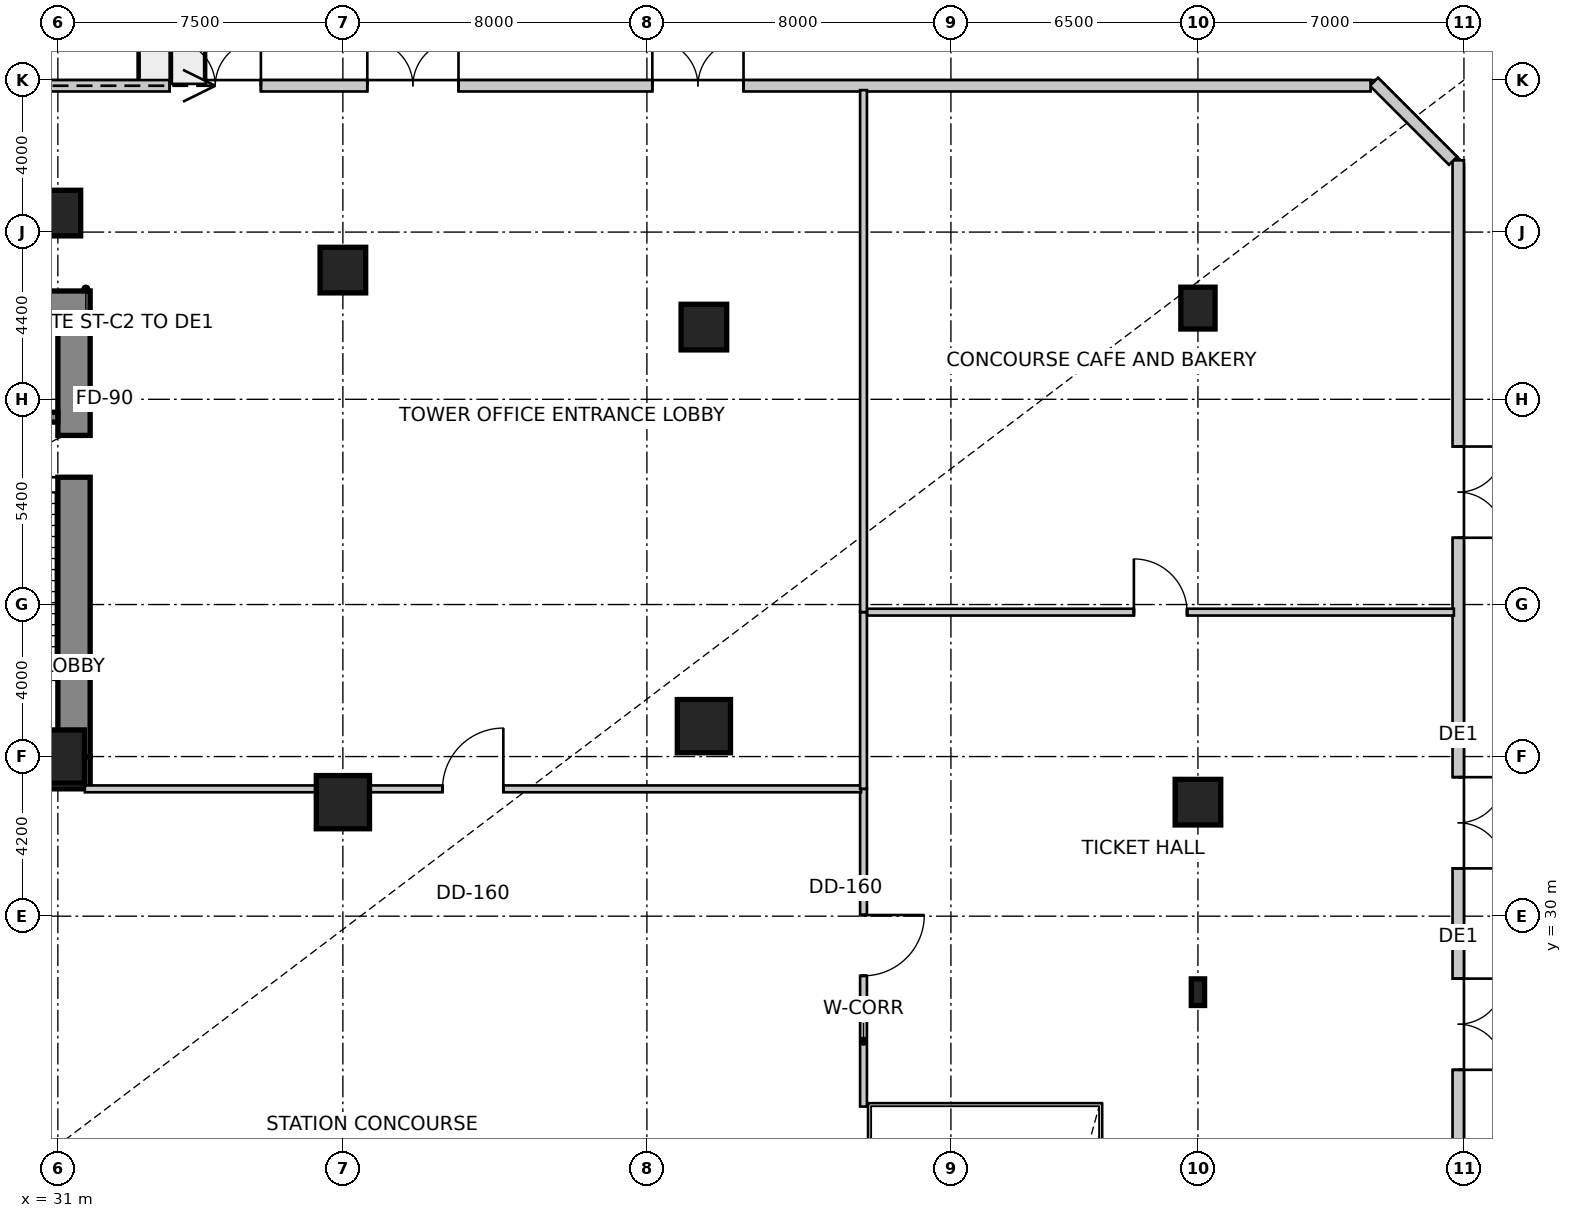
"""IFC4 building model, lengths in metres.
Left out: names, types, materials, properties, quantities, classifications, styles, units other than length and angle.
Written with IfcOpenShell. Run it as: python <this file> out.ifc"""

import sys

from ifc_helpers import new_model, si_unit, direction, frame, frame_2d, origin, origin_2d, place, context, subcontext, project, spatial, rectangle, extrude, source, transform, mapped, element, fill, save


model = new_model("IFC4")
c1 = context("Model", 3, precision=1e-05, world=origin(), true_north=direction((0.0, 1.0)))
c2 = subcontext(c1, "Body", "Model", "MODEL_VIEW")
j1 = project(units=[si_unit("LENGTHUNIT", "METRE"), si_unit("PLANEANGLEUNIT", "RADIAN")], contexts=[c1])
p1 = place(None, origin())
s1 = spatial("IfcSite", under=j1, at=p1, CompositionType="ELEMENT")
p2 = place(p1, origin())
s2 = spatial("IfcBuilding", under=s1, at=p2, CompositionType="ELEMENT")
p3 = place(p2, origin())
s3 = spatial("IfcBuildingStorey", under=s2, at=p3, CompositionType="ELEMENT", Elevation=0.0)
p4 = place(p3, frame((15.75, 46.025, 0.0), z_axis=(0.0, 0.0, 1.0), x_axis=(1.0, 0.0, 0.0)))
e1 = element("IfcWall", 1, at=p4, inside=s3, PredefinedType="SHEAR", context=c2, shape_type="SweptSolid", body=[
    extrude(rectangle(XDim=16.1, YDim=0.85, at=frame_2d((8.05, 0.0))), origin(), (0.0, 0.0, 1.0), 6.0),
])
p5 = place(p3, frame((15.75, 33.775, 0.0), z_axis=(0.0, 0.0, 1.0), x_axis=(1.0, 0.0, 0.0)))
e2 = element("IfcWall", 2, at=p5, inside=s3, PredefinedType="SHEAR", context=c2, shape_type="SweptSolid", body=[
    extrude(rectangle(XDim=16.1, YDim=0.85, at=frame_2d((8.05, 0.0))), origin(), (0.0, 0.0, 1.0), 6.0),
])
m1 = source(origin(), c2, "Body", "SweptSolid", [
    extrude(rectangle(XDim=1.3, YDim=2.15, at=frame_2d((0.65, 1.075))), frame((0.0, 0.435, 0.0), z_axis=(0.0, -1.0, 0.0), x_axis=(1.0, 0.0, 0.0)), (0.0, 0.0, 1.0), 0.87),
])
p6 = place(p5, frame((10.18, 0.0, 0.0)))
e3 = element("IfcOpeningElement", 3, at=p6, cuts=e2, PredefinedType="OPENING", context=c2, shape_type="MappedRepresentation", body=[
    mapped(m1, transform((0.0, 0.0, 0.0), scale=1.0)),
])
p7 = place(p3, frame((31.425, 34.2, 0.0), z_axis=(0.0, 0.0, 1.0), x_axis=(0.0, 1.0, 0.0)))
e4 = element("IfcWall", 4, at=p7, inside=s3, PredefinedType="SHEAR", context=c2, shape_type="SweptSolid", body=[
    extrude(rectangle(XDim=11.4, YDim=0.85, at=frame_2d((5.7, 0.0))), origin(), (0.0, 0.0, 1.0), 6.0),
])
m2 = source(origin(), c2, "Body", "SweptSolid", [
    extrude(rectangle(XDim=1.1, YDim=2.15, at=frame_2d((0.55, 1.075))), frame((0.0, 0.435, 0.0), z_axis=(0.0, -1.0, 0.0), x_axis=(1.0, 0.0, 0.0)), (0.0, 0.0, 1.0), 0.87),
])
p8 = place(p7, frame((7.35, 0.0, 0.0)))
e5 = element("IfcOpeningElement", 5, at=p8, cuts=e4, PredefinedType="OPENING", context=c2, shape_type="MappedRepresentation", body=[
    mapped(m2, transform((0.0, 0.0, 0.0), scale=1.0)),
])
p9 = place(p3, frame((27.5, 43.13, 0.0), z_axis=(0.0, 0.0, 1.0), x_axis=(1.0, 0.0, 0.0)))
e6 = element("IfcWall", 6, at=p9, inside=s3, PredefinedType="SHEAR", context=c2, shape_type="SweptSolid", body=[
    extrude(rectangle(XDim=3.5, YDim=0.26, at=frame_2d((1.75, 0.0))), origin(), (0.0, 0.0, 1.0), 6.0),
])
m3 = source(origin(), c2, "Body", "SweptSolid", [
    extrude(rectangle(XDim=1.4, YDim=1.4, at=origin_2d()), origin(), (0.0, 0.0, 1.0), 6.0),
])
for number, where, z_axis, x_axis in (
    (7, (31.0, 34.2, 0.0), (0.0, 0.0, 1.0), (1.0, 0.0, 0.0)),
    (8, (38.5, 33.0, 0.0), (0.0, 0.0, 1.0), (1.0, 0.0, 0.0)),
    (9, (48.0, 35.0, 0.0), (0.0, 0.0, 1.0), (1.0, 0.0, 0.0)),
):
    element("IfcColumn", number, at=place(p3, frame(where, z_axis=z_axis, x_axis=x_axis)), inside=s3, PredefinedType="COLUMN", context=c2, shape_type="MappedRepresentation", body=[
        mapped(m3, transform((0.0, 0.0, 0.0), scale=1.0)),
    ])
m4 = source(origin(), c2, "Body", "SweptSolid", [
    extrude(rectangle(XDim=1.2, YDim=1.2, at=origin_2d()), origin(), (0.0, 0.0, 1.0), 6.0),
])
for number, where, z_axis, x_axis in (
    (10, (61.0, 33.0, 0.0), (0.0, 0.0, 1.0), (1.0, 0.0, 0.0)),
    (11, (31.0, 48.5, 0.0), (0.0, 0.0, 1.0), (1.0, 0.0, 0.0)),
    (12, (38.5, 47.0, 0.0), (0.0, 0.0, 1.0), (1.0, 0.0, 0.0)),
    (13, (48.0, 45.5, 0.0), (0.0, 0.0, 1.0), (1.0, 0.0, 0.0)),
):
    element("IfcColumn", number, at=place(p3, frame(where, z_axis=z_axis, x_axis=x_axis)), inside=s3, PredefinedType="COLUMN", context=c2, shape_type="MappedRepresentation", body=[
        mapped(m4, transform((0.0, 0.0, 0.0), scale=1.0)),
    ])
m5 = source(origin(), c2, "Body", "SweptSolid", [
    extrude(rectangle(XDim=0.9, YDim=1.1, at=origin_2d()), origin(), (0.0, 0.0, 1.0), 6.0),
])
p10 = place(p3, frame((61.0, 46.0, 0.0), z_axis=(0.0, 0.0, 1.0), x_axis=(1.0, 0.0, 0.0)))
e14 = element("IfcColumn", 14, at=p10, inside=s3, PredefinedType="COLUMN", context=c2, shape_type="MappedRepresentation", body=[
    mapped(m5, transform((0.0, 0.0, 0.0), scale=1.0)),
])
m6 = source(origin(), c2, "Body", "SweptSolid", [
    extrude(rectangle(XDim=0.35, YDim=0.7, at=origin_2d()), origin(), (0.0, 0.0, 1.0), 6.0),
])
p11 = place(p3, frame((61.0, 28.0, 0.0), z_axis=(0.0, 0.0, 1.0), x_axis=(1.0, 0.0, 0.0)))
e15 = element("IfcColumn", 15, at=p11, inside=s3, PredefinedType="PILASTER", context=c2, shape_type="MappedRepresentation", body=[
    mapped(m6, transform((0.0, 0.0, 0.0), scale=1.0)),
])
p12 = place(p3, frame((67.85, 49.888, 0.0), z_axis=(0.0, 0.0, 1.0), x_axis=(0.0, -1.0, 0.0)))
e16 = element("IfcWall", 16, at=p12, inside=s3, PredefinedType="SOLIDWALL", context=c2, shape_type="SweptSolid", body=[
    extrude(rectangle(XDim=45.431, YDim=0.3, at=frame_2d((22.715, 0.0))), origin(), (0.0, 0.0, 1.0), 5.7),
])
m7 = source(origin(), c2, "Body", "SweptSolid", [
    extrude(rectangle(XDim=2.4, YDim=2.8, at=frame_2d((1.2, 1.4))), frame((0.0, 0.16, 0.0), z_axis=(0.0, -1.0, 0.0), x_axis=(1.0, 0.0, 0.0)), (0.0, 0.0, 1.0), 0.32),
])
p13 = place(p12, frame((21.531, 0.0, 0.0)))
e17 = element("IfcOpeningElement", 17, at=p13, cuts=e16, PredefinedType="OPENING", context=c2, shape_type="MappedRepresentation", body=[
    mapped(m7, transform((0.0, 0.0, 0.0), scale=1.0)),
])
p14 = place(p12, frame((16.231, 0.0, 0.0)))
e18 = element("IfcOpeningElement", 18, at=p14, cuts=e16, PredefinedType="OPENING", context=c2, shape_type="MappedRepresentation", body=[
    mapped(m7, transform((0.0, 0.0, 0.0), scale=1.0)),
])
p15 = place(p12, frame((7.531, 0.0, 0.0)))
e19 = element("IfcOpeningElement", 19, at=p15, cuts=e16, PredefinedType="OPENING", context=c2, shape_type="MappedRepresentation", body=[
    mapped(m7, transform((0.0, 0.0, 0.0), scale=1.0)),
])
p16 = place(p3, frame((65.632, 51.956, 0.0), z_axis=(0.0, 0.0, 1.0), x_axis=(0.707106781187, -0.707106781187, 0.0)))
e20 = element("IfcWall", 20, at=p16, inside=s3, PredefinedType="SOLIDWALL", context=c2, shape_type="SweptSolid", body=[
    extrude(rectangle(XDim=2.942, YDim=0.3, at=frame_2d((1.471, 0.0))), origin(), (0.0, 0.0, 1.0), 5.7),
])
p17 = place(p3, frame((4.112, 51.85, 0.0), z_axis=(0.0, 0.0, 1.0), x_axis=(1.0, 0.0, 0.0)))
e21 = element("IfcWall", 21, at=p17, inside=s3, PredefinedType="SOLIDWALL", context=c2, shape_type="SweptSolid", body=[
    extrude(rectangle(XDim=61.431, YDim=0.3, at=frame_2d((30.715, 0.0))), origin(), (0.0, 0.0, 1.0), 5.7),
])
p18 = place(p17, frame((42.531, 0.0, 0.0)))
e22 = element("IfcOpeningElement", 22, at=p18, cuts=e21, PredefinedType="OPENING", context=c2, shape_type="MappedRepresentation", body=[
    mapped(m7, transform((0.0, 0.0, 0.0), scale=1.0)),
])
p19 = place(p17, frame((35.031, 0.0, 0.0)))
e23 = element("IfcOpeningElement", 23, at=p19, cuts=e21, PredefinedType="OPENING", context=c2, shape_type="MappedRepresentation", body=[
    mapped(m7, transform((0.0, 0.0, 0.0), scale=1.0)),
])
p20 = place(p17, frame((29.831, 0.0, 0.0)))
e24 = element("IfcOpeningElement", 24, at=p20, cuts=e21, PredefinedType="OPENING", context=c2, shape_type="MappedRepresentation", body=[
    mapped(m7, transform((0.0, 0.0, 0.0), scale=1.0)),
])
m8 = source(origin(), c2, "Body", "SweptSolid", [
    extrude(rectangle(XDim=1.8, YDim=2.4, at=frame_2d((0.9, 1.2))), frame((0.0, 0.16, 0.0), z_axis=(0.0, -1.0, 0.0), x_axis=(1.0, 0.0, 0.0)), (0.0, 0.0, 1.0), 0.32),
])
p21 = place(p17, frame((9.181, 0.0, 0.0)))
e25 = element("IfcOpeningElement", 25, at=p21, cuts=e21, PredefinedType="OPENING", context=c2, shape_type="MappedRepresentation", body=[
    mapped(m8, transform((0.0, 0.0, 0.0), scale=1.0)),
])
p22 = place(p3, frame((52.2, 33.35, 0.0), z_axis=(0.0, 0.0, 1.0), x_axis=(0.0, -1.0, 0.0)))
e26 = element("IfcWall", 26, at=p22, inside=s3, PredefinedType="PARTITIONING", context=c2, shape_type="SweptSolid", body=[
    extrude(rectangle(XDim=8.36, YDim=0.18, at=frame_2d((4.18, 0.0))), origin(), (0.0, 0.0, 1.0), 5.7),
])
m9 = source(origin(), c2, "Body", "SweptSolid", [
    extrude(rectangle(XDim=1.6, YDim=2.15, at=frame_2d((0.8, 1.075))), frame((0.0, 0.1, 0.0), z_axis=(0.0, -1.0, 0.0), x_axis=(1.0, 0.0, 0.0)), (0.0, 0.0, 1.0), 0.2),
])
p23 = place(p22, frame((3.319, 0.0, 0.0)))
e27 = element("IfcOpeningElement", 27, at=p23, cuts=e26, PredefinedType="OPENING", context=c2, shape_type="MappedRepresentation", body=[
    mapped(m9, transform((0.0, 0.0, 0.0), scale=1.0)),
])
p24 = place(p3, frame((31.71, 33.35, 0.0), z_axis=(0.0, 0.0, 1.0), x_axis=(1.0, 0.0, 0.0)))
e28 = element("IfcWall", 28, at=p24, inside=s3, PredefinedType="PARTITIONING", context=c2, shape_type="SweptSolid", body=[
    extrude(rectangle(XDim=20.424, YDim=0.18, at=frame_2d((10.212, 0.0))), origin(), (0.0, 0.0, 1.0), 3.892),
])
p25 = place(p24, frame((9.412, 0.0, 0.0)))
e29 = element("IfcOpeningElement", 29, at=p25, cuts=e28, PredefinedType="OPENING", context=c2, shape_type="MappedRepresentation", body=[
    mapped(m9, transform((0.0, 0.0, 0.0), scale=1.0)),
])
p26 = place(p3, frame((52.2, 33.352, 0.0), z_axis=(0.0, 0.0, 1.0), x_axis=(0.0, 1.0, 0.0)))
e30 = element("IfcWall", 30, at=p26, inside=s3, PredefinedType="PARTITIONING", context=c2, shape_type="SweptSolid", body=[
    extrude(rectangle(XDim=4.648, YDim=0.18, at=frame_2d((2.324, 0.0))), origin(), (0.0, 0.0, 1.0), 4.492),
])
p27 = place(p3, frame((52.294, 38.0, 0.0), z_axis=(0.0, 0.0, 1.0), x_axis=(1.0, 0.0, 0.0)))
e31 = element("IfcWall", 31, at=p27, inside=s3, PredefinedType="PARTITIONING", context=c2, shape_type="SweptSolid", body=[
    extrude(rectangle(XDim=15.441, YDim=0.18, at=frame_2d((7.721, 0.0))), origin(), (0.0, 0.0, 1.0), 4.742),
])
m10 = source(origin(), c2, "Body", "SweptSolid", [
    extrude(rectangle(XDim=1.4, YDim=2.15, at=frame_2d((0.7, 1.075))), frame((0.0, 0.1, 0.0), z_axis=(0.0, -1.0, 0.0), x_axis=(1.0, 0.0, 0.0)), (0.0, 0.0, 1.0), 0.2),
])
p28 = place(p27, frame((7.021, 0.0, 0.0)))
e32 = element("IfcOpeningElement", 32, at=p28, cuts=e31, PredefinedType="OPENING", context=c2, shape_type="MappedRepresentation", body=[
    mapped(m10, transform((0.0, 0.0, 0.0), scale=1.0)),
])
p29 = place(p3, frame((52.2, 51.735, 0.0), z_axis=(0.0, 0.0, 1.0), x_axis=(0.0, -1.0, 0.0)))
e33 = element("IfcWall", 33, at=p29, inside=s3, PredefinedType="PARTITIONING", context=c2, shape_type="SweptSolid", body=[
    extrude(rectangle(XDim=13.733, YDim=0.18, at=frame_2d((6.867, 0.0))), origin(), (0.0, 0.0, 1.0), 4.742),
])
m11 = source(origin(), c2, "Body", "SweptSolid", [
    extrude(rectangle(XDim=2.4, YDim=2.8, at=frame_2d((1.2, 1.4))), frame((0.0, 0.025, 0.0), z_axis=(0.0, -1.0, 0.0), x_axis=(1.0, 0.0, 0.0)), (0.0, 0.0, 1.0), 0.05),
])
p30 = place(p13, origin())
e34 = element("IfcDoor", 34, at=p30, inside=s3, OperationType="DOUBLE_DOOR_SINGLE_SWING", PredefinedType="DOOR", context=c2, shape_type="MappedRepresentation", body=[
    mapped(m11, transform((0.0, 0.0, 0.0), scale=1.0)),
])
fill(e17, e34)
p31 = place(p14, origin())
e35 = element("IfcDoor", 35, at=p31, inside=s3, OperationType="DOUBLE_DOOR_SINGLE_SWING", PredefinedType="DOOR", context=c2, shape_type="MappedRepresentation", body=[
    mapped(m11, transform((0.0, 0.0, 0.0), scale=1.0)),
])
fill(e18, e35)
p32 = place(p15, origin())
e36 = element("IfcDoor", 36, at=p32, inside=s3, OperationType="DOUBLE_DOOR_SINGLE_SWING", PredefinedType="DOOR", context=c2, shape_type="MappedRepresentation", body=[
    mapped(m11, transform((0.0, 0.0, 0.0), scale=1.0)),
])
fill(e19, e36)
p33 = place(p18, origin())
e37 = element("IfcDoor", 37, at=p33, inside=s3, OperationType="DOUBLE_DOOR_SINGLE_SWING", PredefinedType="DOOR", context=c2, shape_type="MappedRepresentation", body=[
    mapped(m11, transform((0.0, 0.0, 0.0), scale=1.0)),
])
fill(e22, e37)
p34 = place(p19, origin())
e38 = element("IfcDoor", 38, at=p34, inside=s3, OperationType="DOUBLE_DOOR_SINGLE_SWING", PredefinedType="DOOR", context=c2, shape_type="MappedRepresentation", body=[
    mapped(m11, transform((0.0, 0.0, 0.0), scale=1.0)),
])
fill(e23, e38)
p35 = place(p20, origin())
e39 = element("IfcDoor", 39, at=p35, inside=s3, OperationType="DOUBLE_DOOR_SINGLE_SWING", PredefinedType="DOOR", context=c2, shape_type="MappedRepresentation", body=[
    mapped(m11, transform((0.0, 0.0, 0.0), scale=1.0)),
])
fill(e24, e39)
m12 = source(origin(), c2, "Body", "SweptSolid", [
    extrude(rectangle(XDim=1.1, YDim=2.15, at=frame_2d((0.55, 1.075))), frame((0.0, 0.025, 0.0), z_axis=(0.0, -1.0, 0.0), x_axis=(1.0, 0.0, 0.0)), (0.0, 0.0, 1.0), 0.05),
])
p36 = place(p8, origin())
e40 = element("IfcDoor", 40, at=p36, inside=s3, OperationType="SINGLE_SWING_LEFT", PredefinedType="DOOR", context=c2, shape_type="MappedRepresentation", body=[
    mapped(m12, transform((0.0, 0.0, 0.0), scale=1.0)),
])
fill(e5, e40)
m13 = source(origin(), c2, "Body", "SweptSolid", [
    extrude(rectangle(XDim=1.6, YDim=2.15, at=frame_2d((0.8, 1.075))), frame((0.0, 0.025, 0.0), z_axis=(0.0, -1.0, 0.0), x_axis=(1.0, 0.0, 0.0)), (0.0, 0.0, 1.0), 0.05),
])
p37 = place(p23, origin())
e41 = element("IfcDoor", 41, at=p37, inside=s3, OperationType="SINGLE_SWING_LEFT", PredefinedType="DOOR", context=c2, shape_type="MappedRepresentation", body=[
    mapped(m13, transform((0.0, 0.0, 0.0), scale=1.0)),
])
fill(e27, e41)
p38 = place(p25, origin())
e42 = element("IfcDoor", 42, at=p38, inside=s3, OperationType="SINGLE_SWING_RIGHT", PredefinedType="DOOR", context=c2, shape_type="MappedRepresentation", body=[
    mapped(m13, transform((0.0, 0.0, 0.0), scale=1.0)),
])
fill(e29, e42)
m14 = source(origin(), c2, "Body", "SweptSolid", [
    extrude(rectangle(XDim=1.4, YDim=2.15, at=frame_2d((0.7, 1.075))), frame((0.0, 0.025, 0.0), z_axis=(0.0, -1.0, 0.0), x_axis=(1.0, 0.0, 0.0)), (0.0, 0.0, 1.0), 0.05),
])
p39 = place(p28, origin())
e43 = element("IfcDoor", 43, at=p39, inside=s3, OperationType="SINGLE_SWING_LEFT", PredefinedType="DOOR", context=c2, shape_type="MappedRepresentation", body=[
    mapped(m14, transform((0.0, 0.0, 0.0), scale=1.0)),
])
fill(e32, e43)
save(model, sys.argv[1])
